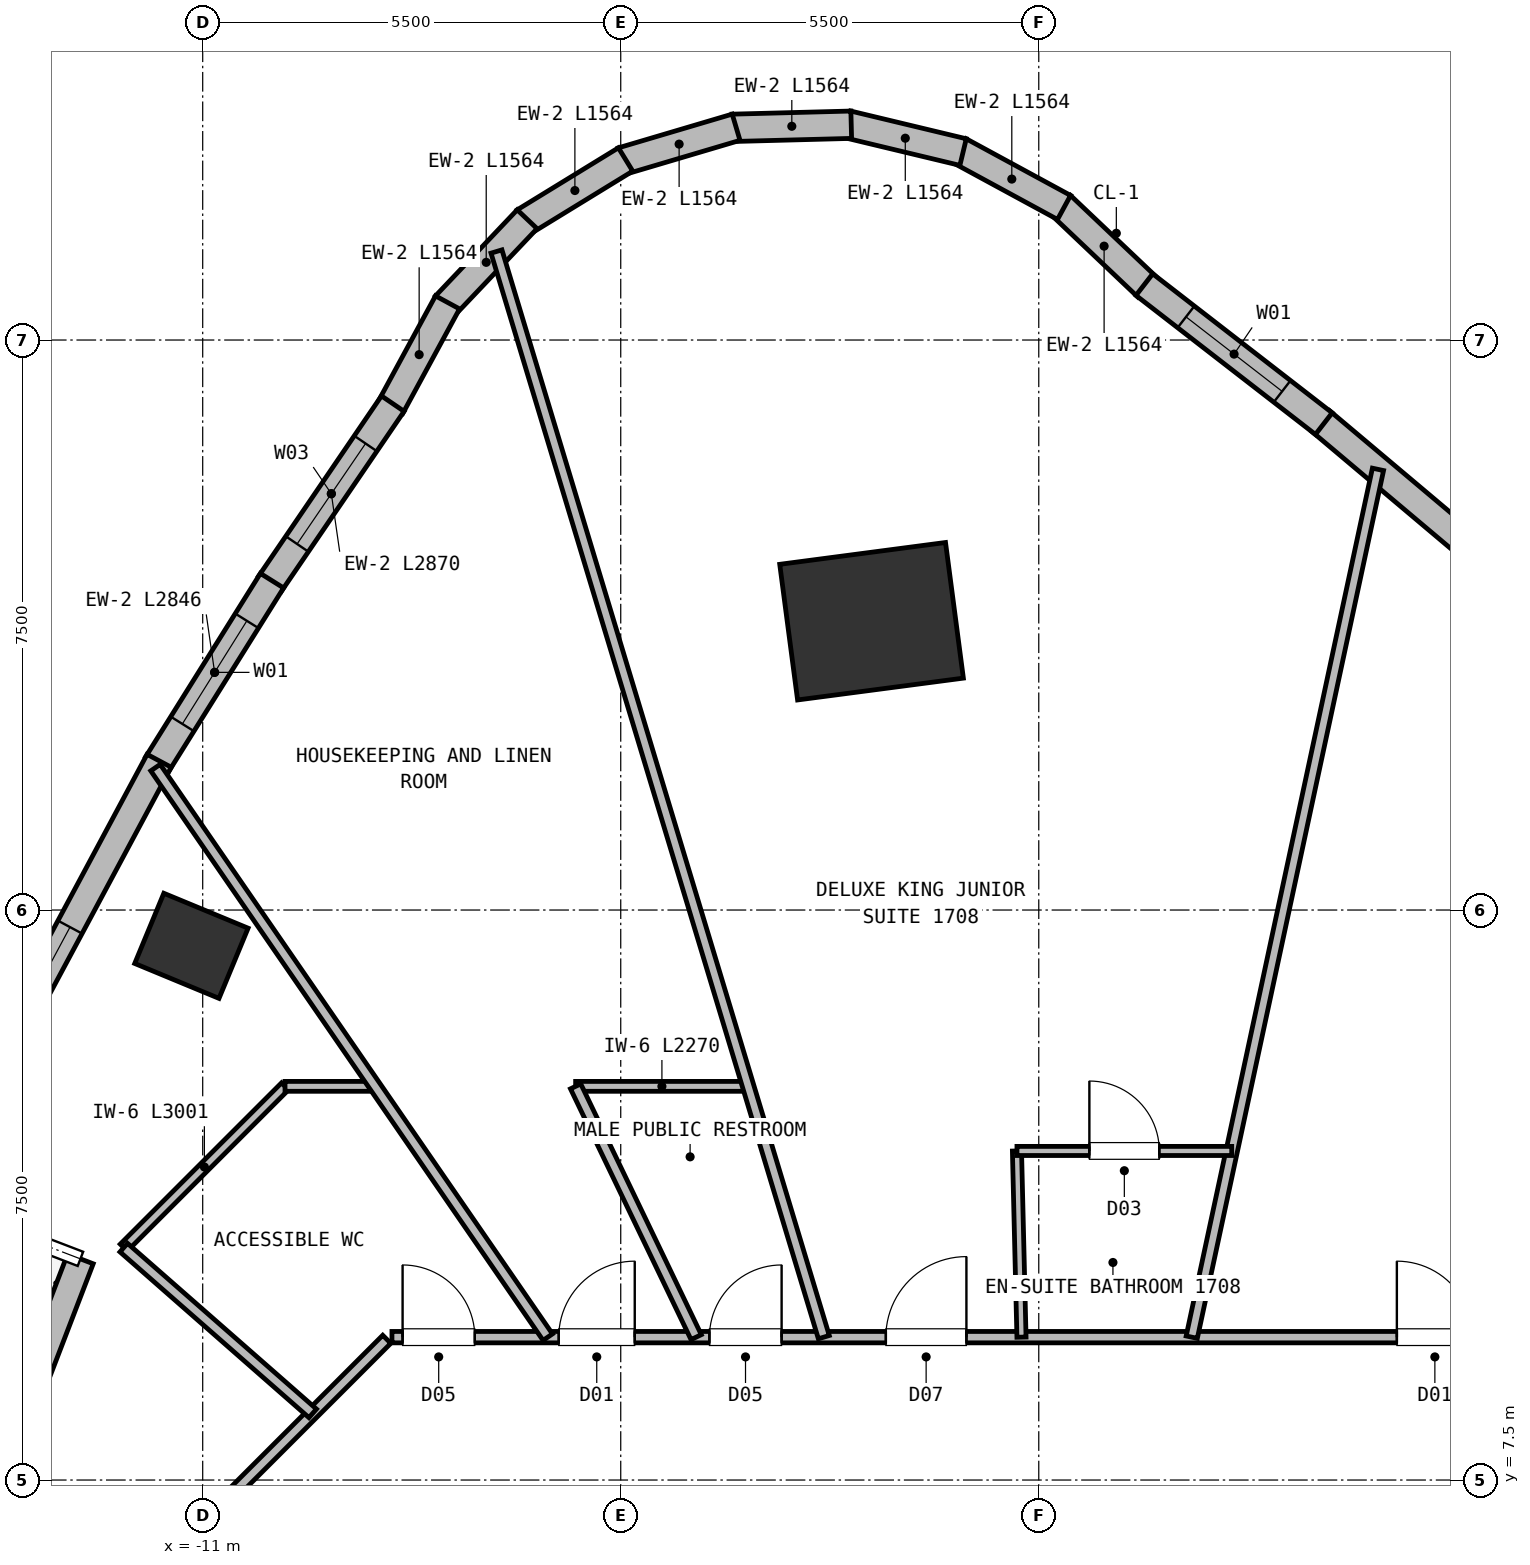
"""IFC4 building model, lengths in metres.
Left out: names, types, materials, properties, quantities, classifications, styles, units other than length and angle.
Written with IfcOpenShell. Run it as: python <this file> out.ifc"""

import sys

from ifc_helpers import new_model, si_unit, direction, frame, frame_2d, origin, origin_2d, place, context, subcontext, project, spatial, rectangle, extrude, element, fill, save


model = new_model("IFC4")
c1 = context("Model", 3, precision=1e-05, world=origin(), true_north=direction((0.0, 1.0)))
c2 = subcontext(c1, "Body", "Model", "MODEL_VIEW")
j1 = project(units=[si_unit("LENGTHUNIT", "METRE"), si_unit("PLANEANGLEUNIT", "RADIAN")], contexts=[c1])
p1 = place(None, origin())
s1 = spatial("IfcSite", under=j1, at=p1, CompositionType="ELEMENT")
p2 = place(p1, origin())
s2 = spatial("IfcBuilding", under=s1, at=p2, CompositionType="ELEMENT")
p3 = place(p2, frame((0.0, 0.0, 60.5)))
s3 = spatial("IfcBuildingStorey", under=s2, at=p3, CompositionType="ELEMENT", Elevation=60.5)
p4 = place(p3, frame((-2.2, 18.8, 0.0), z_axis=(0.0, 0.0, 1.0), x_axis=(-0.13052619222, 0.991444861374, 0.0)))
e1 = element("IfcColumn", 1, at=p4, inside=s3, PredefinedType="COLUMN", context=c2, shape_type="SweptSolid", body=[
    extrude(rectangle(XDim=1.8, YDim=2.2, at=origin_2d()), origin(), (0.0, 0.0, 1.0), 3.75),
])
p5 = place(p3, frame((-11.148, 14.529, 0.0), z_axis=(0.0, 0.0, 1.0), x_axis=(0.382683432365, 0.923879532511, 0.0)))
e2 = element("IfcColumn", 2, at=p5, inside=s3, PredefinedType="COLUMN", context=c2, shape_type="SweptSolid", body=[
    extrude(rectangle(XDim=1.0, YDim=1.2, at=origin_2d()), origin(), (0.0, 0.0, 1.0), 3.75),
])
p6 = place(p3, frame((-16.336, 0.701, 0.0), z_axis=(0.0, 0.0, 1.0), x_axis=(0.358370224529, 0.93357955321, 0.0)))
e3 = element("IfcWall", 3, at=p6, inside=s3, PredefinedType="SOLIDWALL", context=c2, shape_type="SweptSolid", body=[
    extrude(rectangle(XDim=10.4, YDim=0.36, at=frame_2d((5.2, 0.0))), origin(), (0.0, 0.0, 1.0), 3.5),
])
p7 = place(p6, frame((2.8, 0.0, 0.0)))
e4 = element("IfcOpeningElement", 4, at=p7, cuts=e3, PredefinedType="OPENING", context=c2, shape_type="SweptSolid", body=[
    extrude(rectangle(XDim=1.65, YDim=2.25, at=frame_2d((0.825, 1.125))), frame((0.0, 0.19, 0.0), z_axis=(0.0, -1.0, 0.0), x_axis=(1.0, 0.0, 0.0)), (0.0, 0.0, 1.0), 0.38),
])
for number, where, z_axis, x_axis in (
    (5, (0.292, 24.273, 0.0), (0.0, 0.0, 1.0), (0.725, -0.688, 0.0)),
    (6, (-1.042, 24.991, 0.0), (0.0, 0.0, 1.0), (0.879, -0.477, 0.0)),
    (7, (-2.517, 25.338, 0.0), (0.0, 0.0, 1.0), (0.972, -0.233, 0.0)),
):
    element("IfcWall", number, at=place(p3, frame(where, z_axis=z_axis, x_axis=x_axis)), inside=s3, PredefinedType="SOLIDWALL", context=c2, shape_type="SweptSolid", body=[
        extrude(rectangle(XDim=1.564, YDim=0.36, at=frame_2d((0.782, 0.0))), origin(), (0.0, 0.0, 1.0), 3.5),
    ])
for number, where, z_axis, x_axis in (
    (8, (-4.031, 25.292, 0.0), (0.0, 0.0, 1.0), (1.0, 0.026, 0.0)),
    (9, (-5.482, 24.855, 0.0), (0.0, 0.0, 1.0), (0.959, 0.284, 0.0)),
    (10, (-6.77, 24.058, 0.0), (0.0, 0.0, 1.0), (0.853, 0.523, 0.0)),
):
    element("IfcWall", number, at=place(p3, frame(where, z_axis=z_axis, x_axis=x_axis)), inside=s3, PredefinedType="SOLIDWALL", context=c2, shape_type="SweptSolid", body=[
        extrude(rectangle(XDim=1.564, YDim=0.36, at=frame_2d((0.782, 0.0))), origin(), (0.0, 0.0, 1.0), 3.5),
    ])
for number, where, z_axis, x_axis in (
    (11, (-7.808, 22.955, 0.0), (0.0, 0.0, 1.0), (0.688, 0.725, 0.0)),
    (12, (-8.525, 21.621, 0.0), (0.0, 0.0, 1.0), (0.477, 0.879, 0.0)),
):
    element("IfcWall", number, at=place(p3, frame(where, z_axis=z_axis, x_axis=x_axis)), inside=s3, PredefinedType="SOLIDWALL", context=c2, shape_type="SweptSolid", body=[
        extrude(rectangle(XDim=1.564, YDim=0.36, at=frame_2d((0.782, 0.0))), origin(), (0.0, 0.0, 1.0), 3.5),
    ])
p8 = place(p3, frame((-10.116, 19.292, 0.0), z_axis=(0.0, 0.0, 1.0), x_axis=(0.563210121539, 0.826313717057, 0.0)))
e13 = element("IfcWall", 13, at=p8, inside=s3, PredefinedType="SOLIDWALL", context=c2, shape_type="SweptSolid", body=[
    extrude(rectangle(XDim=2.87, YDim=0.36, at=frame_2d((1.435, 0.0))), origin(), (0.0, 0.0, 1.0), 3.5),
])
p9 = place(p8, frame((0.635, 0.0, 0.72)))
e14 = element("IfcOpeningElement", 14, at=p9, cuts=e13, PredefinedType="OPENING", context=c2, shape_type="SweptSolid", body=[
    extrude(rectangle(XDim=1.6, YDim=1.88, at=frame_2d((0.8, 0.94))), frame((0.0, 0.19, 0.0), z_axis=(0.0, -1.0, 0.0), x_axis=(1.0, 0.0, 0.0)), (0.0, 0.0, 1.0), 0.38),
])
p10 = place(p3, frame((-11.598, 16.92, 0.0), z_axis=(0.0, 0.0, 1.0), x_axis=(0.530399781812, 0.847747646092, 0.0)))
e15 = element("IfcWall", 15, at=p10, inside=s3, PredefinedType="SOLIDWALL", context=c2, shape_type="SweptSolid", body=[
    extrude(rectangle(XDim=2.846, YDim=0.36, at=frame_2d((1.423, 0.0))), origin(), (0.0, 0.0, 1.0), 3.5),
])
p11 = place(p10, frame((0.623, 0.0, 0.72)))
e16 = element("IfcOpeningElement", 16, at=p11, cuts=e15, PredefinedType="OPENING", context=c2, shape_type="SweptSolid", body=[
    extrude(rectangle(XDim=1.6, YDim=1.88, at=frame_2d((0.8, 0.94))), frame((0.0, 0.19, 0.0), z_axis=(0.0, -1.0, 0.0), x_axis=(1.0, 0.0, 0.0)), (0.0, 0.0, 1.0), 0.38),
])
p12 = place(p3, frame((-14.674, 11.177, 0.0), z_axis=(0.0, 0.0, 1.0), x_axis=(0.4723493591, 0.881411415264, 0.0)))
e17 = element("IfcWall", 17, at=p12, inside=s3, PredefinedType="SOLIDWALL", context=c2, shape_type="SweptSolid", body=[
    extrude(rectangle(XDim=6.566, YDim=0.36, at=frame_2d((3.283, 0.0))), origin(), (0.0, 0.0, 1.0), 3.5),
])
p13 = place(p12, frame((2.483, 0.0, 0.72)))
e18 = element("IfcOpeningElement", 18, at=p13, cuts=e17, PredefinedType="OPENING", context=c2, shape_type="SweptSolid", body=[
    extrude(rectangle(XDim=1.6, YDim=1.88, at=frame_2d((0.8, 0.94))), frame((0.0, 0.19, 0.0), z_axis=(0.0, -1.0, 0.0), x_axis=(1.0, 0.0, 0.0)), (0.0, 0.0, 1.0), 0.38),
])
p14 = place(p3, frame((3.711, 21.431, 0.0), z_axis=(0.0, 0.0, 1.0), x_axis=(0.764797881092, -0.644270285732, 0.0)))
e19 = element("IfcWall", 19, at=p14, inside=s3, PredefinedType="SOLIDWALL", context=c2, shape_type="SweptSolid", body=[
    extrude(rectangle(XDim=2.961, YDim=0.36, at=frame_2d((1.481, 0.0))), origin(), (0.0, 0.0, 1.0), 3.5),
])
p15 = place(p3, frame((1.389, 23.229, 0.0), z_axis=(0.0, 0.0, 1.0), x_axis=(0.79052584694, -0.612428677742, 0.0)))
e20 = element("IfcWall", 20, at=p15, inside=s3, PredefinedType="SOLIDWALL", context=c2, shape_type="SweptSolid", body=[
    extrude(rectangle(XDim=2.987, YDim=0.36, at=frame_2d((1.494, 0.0))), origin(), (0.0, 0.0, 1.0), 3.5),
])
p16 = place(p15, frame((0.694, 0.0, 0.72)))
e21 = element("IfcOpeningElement", 21, at=p16, cuts=e20, PredefinedType="OPENING", context=c2, shape_type="SweptSolid", body=[
    extrude(rectangle(XDim=1.6, YDim=1.88, at=frame_2d((0.8, 0.94))), frame((0.0, 0.19, 0.0), z_axis=(0.0, -1.0, 0.0), x_axis=(1.0, 0.0, 0.0)), (0.0, 0.0, 1.0), 0.38),
])
p17 = place(p3, frame((-8.51, 9.38, 0.0), z_axis=(0.0, 0.0, 1.0), x_axis=(1.0, 0.0, 0.0)))
e22 = element("IfcWall", 22, at=p17, inside=s3, PredefinedType="PARTITIONING", context=c2, shape_type="SweptSolid", body=[
    extrude(rectangle(XDim=17.02, YDim=0.15, at=frame_2d((8.51, 0.0))), origin(), (0.0, 0.0, 1.0), 3.5),
])
p18 = place(p17, frame((4.177, 0.0, 0.0)))
e23 = element("IfcOpeningElement", 23, at=p18, cuts=e22, PredefinedType="OPENING", context=c2, shape_type="SweptSolid", body=[
    extrude(rectangle(XDim=0.95, YDim=2.1, at=frame_2d((0.475, 1.05))), frame((0.0, 0.085, 0.0), z_axis=(0.0, -1.0, 0.0), x_axis=(1.0, 0.0, 0.0)), (0.0, 0.0, 1.0), 0.17),
])
p19 = place(p17, frame((0.14, 0.0, 0.0)))
e24 = element("IfcOpeningElement", 24, at=p19, cuts=e22, PredefinedType="OPENING", context=c2, shape_type="SweptSolid", body=[
    extrude(rectangle(XDim=0.95, YDim=2.1, at=frame_2d((0.475, 1.05))), frame((0.0, 0.085, 0.0), z_axis=(0.0, -1.0, 0.0), x_axis=(1.0, 0.0, 0.0)), (0.0, 0.0, 1.0), 0.17),
])
p20 = place(p17, frame((2.194, 0.0, 0.0)))
e25 = element("IfcOpeningElement", 25, at=p20, cuts=e22, PredefinedType="OPENING", context=c2, shape_type="SweptSolid", body=[
    extrude(rectangle(XDim=1.0, YDim=2.15, at=frame_2d((0.5, 1.075))), frame((0.0, 0.085, 0.0), z_axis=(0.0, -1.0, 0.0), x_axis=(1.0, 0.0, 0.0)), (0.0, 0.0, 1.0), 0.17),
])
p21 = place(p17, frame((13.221, 0.0, 0.0)))
e26 = element("IfcOpeningElement", 26, at=p21, cuts=e22, PredefinedType="OPENING", context=c2, shape_type="SweptSolid", body=[
    extrude(rectangle(XDim=1.0, YDim=2.15, at=frame_2d((0.5, 1.075))), frame((0.0, 0.085, 0.0), z_axis=(0.0, -1.0, 0.0), x_axis=(1.0, 0.0, 0.0)), (0.0, 0.0, 1.0), 0.17),
])
p22 = place(p17, frame((6.498, 0.0, 0.0)))
e27 = element("IfcOpeningElement", 27, at=p22, cuts=e22, PredefinedType="OPENING", context=c2, shape_type="SweptSolid", body=[
    extrude(rectangle(XDim=1.06, YDim=2.15, at=frame_2d((0.53, 1.075))), frame((0.0, 0.085, 0.0), z_axis=(0.0, -1.0, 0.0), x_axis=(1.0, 0.0, 0.0)), (0.0, 0.0, 1.0), 0.17),
])
p23 = place(p3, frame((-10.752, 7.178, 0.0), z_axis=(0.0, 0.0, 1.0), x_axis=(0.707067066127, 0.707146494016, 0.0)))
e28 = element("IfcWall", 28, at=p23, inside=s3, PredefinedType="PARTITIONING", context=c2, shape_type="SweptSolid", body=[
    extrude(rectangle(XDim=3.074, YDim=0.15, at=frame_2d((1.537, 0.0))), origin(), (0.0, 0.0, 1.0), 3.5),
])
p24 = place(p3, frame((-6.094, 12.68, 0.0), z_axis=(0.0, 0.0, 1.0), x_axis=(1.0, 0.0, 0.0)))
e29 = element("IfcWall", 29, at=p24, inside=s3, PredefinedType="PARTITIONING", context=c2, shape_type="SweptSolid", body=[
    extrude(rectangle(XDim=2.271, YDim=0.13, at=frame_2d((1.135, 0.0))), origin(), (0.0, 0.0, 1.0), 3.5),
])
p25 = place(p3, frame((-12.039, 10.558, 0.0), z_axis=(0.0, 0.0, 1.0), x_axis=(0.707106781187, 0.707106781187, 0.0)))
e30 = element("IfcWall", 30, at=p25, inside=s3, PredefinedType="PARTITIONING", context=c2, shape_type="SweptSolid", body=[
    extrude(rectangle(XDim=3.001, YDim=0.13, at=frame_2d((1.5, 0.0))), origin(), (0.0, 0.0, 1.0), 3.5),
])
p26 = place(p3, frame((-9.917, 12.68, 0.0), z_axis=(0.0, 0.0, 1.0), x_axis=(1.0, 0.0, 0.0)))
e31 = element("IfcWall", 31, at=p26, inside=s3, PredefinedType="PARTITIONING", context=c2, shape_type="SweptSolid", body=[
    extrude(rectangle(XDim=1.184, YDim=0.13, at=frame_2d((0.592, 0.0))), origin(), (0.0, 0.0, 1.0), 3.5),
])
p27 = place(p3, frame((-9.552, 8.377, 0.0), z_axis=(0.0, 0.0, 1.0), x_axis=(-0.751807906315, 0.659382189631, 0.0)))
e32 = element("IfcWall", 32, at=p27, inside=s3, PredefinedType="PARTITIONING", context=c2, shape_type="SweptSolid", body=[
    extrude(rectangle(XDim=3.307, YDim=0.15, at=frame_2d((1.654, 0.0))), origin(), (0.0, 0.0, 1.0), 3.5),
])
p28 = place(p3, frame((2.013, 9.38, 0.0), z_axis=(0.0, 0.0, 1.0), x_axis=(0.209810339196, 0.977742103812, 0.0)))
e33 = element("IfcWall", 33, at=p28, inside=s3, PredefinedType="PARTITIONING", context=c2, shape_type="SweptSolid", body=[
    extrude(rectangle(XDim=11.678, YDim=0.15, at=frame_2d((5.839, 0.0))), origin(), (0.0, 0.0, 1.0), 3.5),
])
p29 = place(p3, frame((-0.227, 9.38, 0.0), z_axis=(0.0, 0.0, 1.0), x_axis=(-0.024305292765, 0.999704582736, 0.0)))
e34 = element("IfcWall", 34, at=p29, inside=s3, PredefinedType="PARTITIONING", context=c2, shape_type="SweptSolid", body=[
    extrude(rectangle(XDim=2.451, YDim=0.12, at=frame_2d((1.226, 0.0))), origin(), (0.0, 0.0, 1.0), 3.5),
])
p30 = place(p3, frame((-0.287, 11.83, 0.0), z_axis=(0.0, 0.0, 1.0), x_axis=(1.0, 0.0, 0.0)))
e35 = element("IfcWall", 35, at=p30, inside=s3, PredefinedType="PARTITIONING", context=c2, shape_type="SweptSolid", body=[
    extrude(rectangle(XDim=2.825, YDim=0.12, at=frame_2d((1.413, 0.0))), origin(), (0.0, 0.0, 1.0), 3.5),
])
p31 = place(p30, frame((0.953, 0.0, 0.0)))
e36 = element("IfcOpeningElement", 36, at=p31, cuts=e35, PredefinedType="OPENING", context=c2, shape_type="SweptSolid", body=[
    extrude(rectangle(XDim=0.92, YDim=2.1, at=frame_2d((0.46, 1.05))), frame((0.0, 0.07, 0.0), z_axis=(0.0, -1.0, 0.0), x_axis=(1.0, 0.0, 0.0)), (0.0, 0.0, 1.0), 0.14),
])
p32 = place(p3, frame((-2.828, 9.38, 0.0), z_axis=(0.0, 0.0, 1.0), x_axis=(-0.288668703069, 0.957429046911, 0.0)))
e37 = element("IfcWall", 37, at=p32, inside=s3, PredefinedType="PARTITIONING", context=c2, shape_type="SweptSolid", body=[
    extrude(rectangle(XDim=14.92, YDim=0.15, at=frame_2d((7.46, 0.0))), origin(), (0.0, 0.0, 1.0), 3.5),
])
p33 = place(p3, frame((-4.508, 9.38, 0.0), z_axis=(0.0, 0.0, 1.0), x_axis=(-0.433155901161, 0.901319014162, 0.0)))
e38 = element("IfcWall", 38, at=p33, inside=s3, PredefinedType="PARTITIONING", context=c2, shape_type="SweptSolid", body=[
    extrude(rectangle(XDim=3.661, YDim=0.15, at=frame_2d((1.831, 0.0))), origin(), (0.0, 0.0, 1.0), 3.5),
])
p34 = place(p3, frame((-6.46, 9.38, 0.0), z_axis=(0.0, 0.0, 1.0), x_axis=(-0.567187966885, 0.823588374263, 0.0)))
e39 = element("IfcWall", 39, at=p34, inside=s3, PredefinedType="PARTITIONING", context=c2, shape_type="SweptSolid", body=[
    extrude(rectangle(XDim=9.099, YDim=0.15, at=frame_2d((4.55, 0.0))), origin(), (0.0, 0.0, 1.0), 3.5),
])
p35 = place(p9, origin())
e40 = element("IfcWindow", 40, at=p35, inside=s3, PartitioningType="SINGLE_PANEL", PredefinedType="WINDOW", context=c2, shape_type="SweptSolid", body=[
    extrude(rectangle(XDim=1.6, YDim=1.88, at=frame_2d((0.8, 0.94))), frame((0.0, 0.03, 0.0), z_axis=(0.0, -1.0, 0.0), x_axis=(1.0, 0.0, 0.0)), (0.0, 0.0, 1.0), 0.06),
])
fill(e14, e40)
p36 = place(p11, origin())
e41 = element("IfcWindow", 41, at=p36, inside=s3, PartitioningType="SINGLE_PANEL", PredefinedType="WINDOW", context=c2, shape_type="SweptSolid", body=[
    extrude(rectangle(XDim=1.6, YDim=1.88, at=frame_2d((0.8, 0.94))), frame((0.0, 0.03, 0.0), z_axis=(0.0, -1.0, 0.0), x_axis=(1.0, 0.0, 0.0)), (0.0, 0.0, 1.0), 0.06),
])
fill(e16, e41)
p37 = place(p13, origin())
e42 = element("IfcWindow", 42, at=p37, inside=s3, PartitioningType="SINGLE_PANEL", PredefinedType="WINDOW", context=c2, shape_type="SweptSolid", body=[
    extrude(rectangle(XDim=1.6, YDim=1.88, at=frame_2d((0.8, 0.94))), frame((0.0, 0.03, 0.0), z_axis=(0.0, -1.0, 0.0), x_axis=(1.0, 0.0, 0.0)), (0.0, 0.0, 1.0), 0.06),
])
fill(e18, e42)
p38 = place(p16, origin())
e43 = element("IfcWindow", 43, at=p38, inside=s3, PartitioningType="SINGLE_PANEL", PredefinedType="WINDOW", context=c2, shape_type="SweptSolid", body=[
    extrude(rectangle(XDim=1.6, YDim=1.88, at=frame_2d((0.8, 0.94))), frame((0.0, 0.03, 0.0), z_axis=(0.0, -1.0, 0.0), x_axis=(1.0, 0.0, 0.0)), (0.0, 0.0, 1.0), 0.06),
])
fill(e21, e43)
p39 = place(p31, origin())
e44 = element("IfcDoor", 44, at=p39, inside=s3, OperationType="SINGLE_SWING_LEFT", PredefinedType="DOOR", context=c2, shape_type="SweptSolid", body=[
    extrude(rectangle(XDim=0.92, YDim=2.1, at=frame_2d((0.46, 1.05))), frame((0.0, 0.025, 0.0), z_axis=(0.0, -1.0, 0.0), x_axis=(1.0, 0.0, 0.0)), (0.0, 0.0, 1.0), 0.05),
])
fill(e36, e44)
p40 = place(p18, origin())
e45 = element("IfcDoor", 45, at=p40, inside=s3, OperationType="SINGLE_SWING_RIGHT", PredefinedType="DOOR", context=c2, shape_type="SweptSolid", body=[
    extrude(rectangle(XDim=0.95, YDim=2.1, at=frame_2d((0.475, 1.05))), frame((0.0, 0.025, 0.0), z_axis=(0.0, -1.0, 0.0), x_axis=(1.0, 0.0, 0.0)), (0.0, 0.0, 1.0), 0.05),
])
fill(e23, e45)
p41 = place(p19, origin())
e46 = element("IfcDoor", 46, at=p41, inside=s3, OperationType="SINGLE_SWING_LEFT", PredefinedType="DOOR", context=c2, shape_type="SweptSolid", body=[
    extrude(rectangle(XDim=0.95, YDim=2.1, at=frame_2d((0.475, 1.05))), frame((0.0, 0.025, 0.0), z_axis=(0.0, -1.0, 0.0), x_axis=(1.0, 0.0, 0.0)), (0.0, 0.0, 1.0), 0.05),
])
fill(e24, e46)
p42 = place(p20, origin())
e47 = element("IfcDoor", 47, at=p42, inside=s3, OperationType="SINGLE_SWING_RIGHT", PredefinedType="DOOR", context=c2, shape_type="SweptSolid", body=[
    extrude(rectangle(XDim=1.0, YDim=2.15, at=frame_2d((0.5, 1.075))), frame((0.0, 0.025, 0.0), z_axis=(0.0, -1.0, 0.0), x_axis=(1.0, 0.0, 0.0)), (0.0, 0.0, 1.0), 0.05),
])
fill(e25, e47)
p43 = place(p21, origin())
e48 = element("IfcDoor", 48, at=p43, inside=s3, OperationType="SINGLE_SWING_LEFT", PredefinedType="DOOR", context=c2, shape_type="SweptSolid", body=[
    extrude(rectangle(XDim=1.0, YDim=2.15, at=frame_2d((0.5, 1.075))), frame((0.0, 0.025, 0.0), z_axis=(0.0, -1.0, 0.0), x_axis=(1.0, 0.0, 0.0)), (0.0, 0.0, 1.0), 0.05),
])
fill(e26, e48)
p44 = place(p22, origin())
e49 = element("IfcDoor", 49, at=p44, inside=s3, OperationType="SINGLE_SWING_RIGHT", PredefinedType="DOOR", context=c2, shape_type="SweptSolid", body=[
    extrude(rectangle(XDim=1.06, YDim=2.15, at=frame_2d((0.53, 1.075))), frame((0.0, 0.025, 0.0), z_axis=(0.0, -1.0, 0.0), x_axis=(1.0, 0.0, 0.0)), (0.0, 0.0, 1.0), 0.05),
])
fill(e27, e49)
save(model, sys.argv[1])
